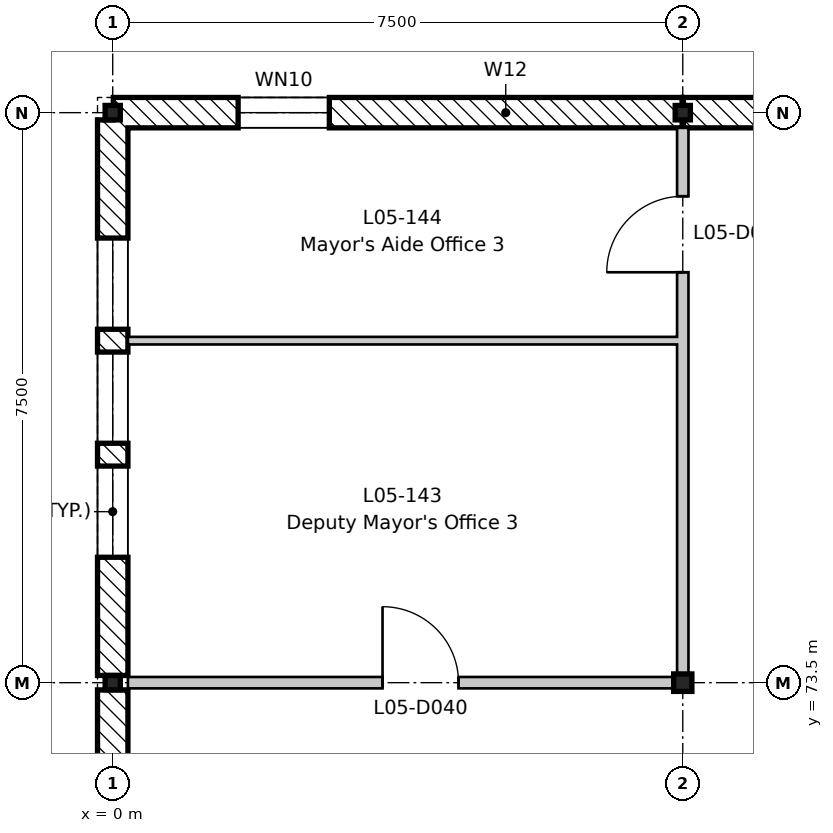
"""IFC4 building model, lengths in metres.
Left out: names, types, materials, properties, quantities, classifications, styles, units other than length and angle.
Written with IfcOpenShell. Run it as: python <this file> out.ifc"""

import sys

from ifc_helpers import new_model, si_unit, direction, frame, frame_2d, origin, origin_2d, place, context, subcontext, project, spatial, rectangle, i_section, extrude, element, fill, save


model = new_model("IFC4")
c1 = context("Model", 3, precision=1e-05, world=origin(), true_north=direction((0.0, 1.0)))
c2 = subcontext(c1, "Body", "Model", "MODEL_VIEW")
j1 = project(units=[si_unit("LENGTHUNIT", "METRE"), si_unit("PLANEANGLEUNIT", "RADIAN")], contexts=[c1])
p1 = place(None, origin())
s1 = spatial("IfcSite", under=j1, at=p1, CompositionType="ELEMENT")
p2 = place(p1, origin())
s2 = spatial("IfcBuilding", under=s1, at=p2, CompositionType="ELEMENT")
p3 = place(p2, frame((0.0, 0.0, 22.8)))
s3 = spatial("IfcBuildingStorey", under=s2, at=p3, CompositionType="ELEMENT", Elevation=22.8)
for number, where, z_axis, x_axis in (
    (1, (0.0, 73.5, -0.2), (0.0, 0.0, 1.0), (1.0, 0.0, 0.0)),
    (2, (0.0, 81.0, -0.2), (0.0, 0.0, 1.0), (1.0, 0.0, 0.0)),
):
    element("IfcColumn", number, at=place(p3, frame(where, z_axis=z_axis, x_axis=x_axis)), inside=s3, PredefinedType="COLUMN", context=c2, shape_type="SweptSolid", body=[
        extrude(i_section(OverallWidth=0.2, OverallDepth=0.19, WebThickness=0.007, FlangeThickness=0.01, FilletRadius=0.018, at=origin_2d()), origin(), (0.0, 0.0, 1.0), 4.15),
    ])
p4 = place(p3, frame((7.5, 73.5, -0.2), z_axis=(0.0, 0.0, 1.0), x_axis=(1.0, 0.0, 0.0)))
e3 = element("IfcColumn", 3, at=p4, inside=s3, PredefinedType="COLUMN", context=c2, shape_type="SweptSolid", body=[
    extrude(i_section(OverallWidth=0.24, OverallDepth=0.23, WebThickness=0.008, FlangeThickness=0.012, FilletRadius=0.021, at=origin_2d()), origin(), (0.0, 0.0, 1.0), 4.15),
])
p5 = place(p3, frame((7.5, 81.0, -0.2), z_axis=(0.0, 0.0, 1.0), x_axis=(1.0, 0.0, 0.0)))
e4 = element("IfcColumn", 4, at=p5, inside=s3, PredefinedType="COLUMN", context=c2, shape_type="SweptSolid", body=[
    extrude(i_section(OverallWidth=0.2, OverallDepth=0.19, WebThickness=0.007, FlangeThickness=0.01, FilletRadius=0.018, at=origin_2d()), origin(), (0.0, 0.0, 1.0), 4.15),
])
p6 = place(p3, frame((0.0, 70.595, 0.0), z_axis=(0.0, 0.0, 1.0), x_axis=(0.0, 1.0, 0.0)))
e5 = element("IfcWall", 5, at=p6, inside=s3, PredefinedType="STANDARD", context=c2, shape_type="SweptSolid", body=[
    extrude(rectangle(XDim=2.81, YDim=0.4, at=frame_2d((1.405, 0.0))), origin(), (0.0, 0.0, 1.0), 3.68),
])
p7 = place(p3, frame((0.0, 73.595, 0.0), z_axis=(0.0, 0.0, 1.0), x_axis=(0.0, 1.0, 0.0)))
e6 = element("IfcWall", 6, at=p7, inside=s3, PredefinedType="STANDARD", context=c2, shape_type="SweptSolid", body=[
    extrude(rectangle(XDim=7.31, YDim=0.4, at=frame_2d((3.655, 0.0))), origin(), (0.0, 0.0, 1.0), 3.55),
])
p8 = place(p7, frame((1.555, 0.0, 0.6)))
e7 = element("IfcOpeningElement", 7, at=p8, cuts=e6, PredefinedType="OPENING", context=c2, shape_type="SweptSolid", body=[
    extrude(rectangle(XDim=1.2, YDim=1.8, at=frame_2d((0.6, 0.9))), frame((0.0, 0.21, 0.0), z_axis=(0.0, -1.0, 0.0), x_axis=(1.0, 0.0, 0.0)), (0.0, 0.0, 1.0), 0.42),
])
p9 = place(p7, frame((3.055, 0.0, 0.6)))
e8 = element("IfcOpeningElement", 8, at=p9, cuts=e6, PredefinedType="OPENING", context=c2, shape_type="SweptSolid", body=[
    extrude(rectangle(XDim=1.2, YDim=1.8, at=frame_2d((0.6, 0.9))), frame((0.0, 0.21, 0.0), z_axis=(0.0, -1.0, 0.0), x_axis=(1.0, 0.0, 0.0)), (0.0, 0.0, 1.0), 0.42),
])
p10 = place(p7, frame((4.555, 0.0, 0.6)))
e9 = element("IfcOpeningElement", 9, at=p10, cuts=e6, PredefinedType="OPENING", context=c2, shape_type="SweptSolid", body=[
    extrude(rectangle(XDim=1.2, YDim=1.8, at=frame_2d((0.6, 0.9))), frame((0.0, 0.21, 0.0), z_axis=(0.0, -1.0, 0.0), x_axis=(1.0, 0.0, 0.0)), (0.0, 0.0, 1.0), 0.42),
])
p11 = place(p3, frame((0.008, 81.0, 0.0), z_axis=(0.0, 0.0, 1.0), x_axis=(1.0, 0.0, 0.0)))
e10 = element("IfcWall", 10, at=p11, inside=s3, PredefinedType="STANDARD", context=c2, shape_type="SweptSolid", body=[
    extrude(rectangle(XDim=7.483, YDim=0.4, at=frame_2d((3.742, 0.0))), origin(), (0.0, 0.0, 1.0), 3.62),
])
p12 = place(p11, frame((1.642, 0.0, 0.6)))
e11 = element("IfcOpeningElement", 11, at=p12, cuts=e10, PredefinedType="OPENING", context=c2, shape_type="SweptSolid", body=[
    extrude(rectangle(XDim=1.2, YDim=1.8, at=frame_2d((0.6, 0.9))), frame((0.0, 0.21, 0.0), z_axis=(0.0, -1.0, 0.0), x_axis=(1.0, 0.0, 0.0)), (0.0, 0.0, 1.0), 0.42),
])
p13 = place(p3, frame((7.508, 81.0, 0.0), z_axis=(0.0, 0.0, 1.0), x_axis=(1.0, 0.0, 0.0)))
e12 = element("IfcWall", 12, at=p13, inside=s3, PredefinedType="STANDARD", context=c2, shape_type="SweptSolid", body=[
    extrude(rectangle(XDim=2.983, YDim=0.4, at=frame_2d((1.492, 0.0))), origin(), (0.0, 0.0, 1.0), 3.75),
])
p14 = place(p3, frame((7.5, 73.5, 0.0), z_axis=(0.0, 0.0, 1.0), x_axis=(0.0, 1.0, 0.0)))
e13 = element("IfcWall", 13, at=p14, inside=s3, PredefinedType="PARTITIONING", context=c2, shape_type="SweptSolid", body=[
    extrude(rectangle(XDim=7.3, YDim=0.15, at=frame_2d((3.65, 0.0))), origin(), (0.0, 0.0, 1.0), 3.43),
])
p15 = place(p14, frame((5.4, 0.0, 0.0)))
e14 = element("IfcOpeningElement", 14, at=p15, cuts=e13, PredefinedType="OPENING", context=c2, shape_type="SweptSolid", body=[
    extrude(rectangle(XDim=1.0, YDim=2.1, at=frame_2d((0.5, 1.05))), frame((0.0, 0.085, 0.0), z_axis=(0.0, -1.0, 0.0), x_axis=(1.0, 0.0, 0.0)), (0.0, 0.0, 1.0), 0.17),
])
p16 = place(p3, frame((0.2, 73.5, 0.0), z_axis=(0.0, 0.0, 1.0), x_axis=(1.0, 0.0, 0.0)))
e15 = element("IfcWall", 15, at=p16, inside=s3, PredefinedType="PARTITIONING", context=c2, shape_type="SweptSolid", body=[
    extrude(rectangle(XDim=7.225, YDim=0.15, at=frame_2d((3.613, 0.0))), origin(), (0.0, 0.0, 1.0), 3.6),
])
p17 = place(p16, frame((3.35, 0.0, 0.0)))
e16 = element("IfcOpeningElement", 16, at=p17, cuts=e15, PredefinedType="OPENING", context=c2, shape_type="SweptSolid", body=[
    extrude(rectangle(XDim=1.0, YDim=2.1, at=frame_2d((0.5, 1.05))), frame((0.0, 0.085, 0.0), z_axis=(0.0, -1.0, 0.0), x_axis=(1.0, 0.0, 0.0)), (0.0, 0.0, 1.0), 0.17),
])
p18 = place(p3, frame((0.2, 78.0, 0.0), z_axis=(0.0, 0.0, 1.0), x_axis=(1.0, 0.0, 0.0)))
e17 = element("IfcWall", 17, at=p18, inside=s3, PredefinedType="PARTITIONING", context=c2, shape_type="SweptSolid", body=[
    extrude(rectangle(XDim=7.225, YDim=0.1, at=frame_2d((3.613, 0.0))), origin(), (0.0, 0.0, 1.0), 3.95),
])
p19 = place(p8, origin())
e18 = element("IfcWindow", 18, at=p19, inside=s3, PartitioningType="SINGLE_PANEL", PredefinedType="WINDOW", context=c2, shape_type="SweptSolid", body=[
    extrude(rectangle(XDim=1.2, YDim=1.8, at=frame_2d((0.6, 0.9))), frame((0.0, 0.03, 0.0), z_axis=(0.0, -1.0, 0.0), x_axis=(1.0, 0.0, 0.0)), (0.0, 0.0, 1.0), 0.06),
])
fill(e7, e18)
p20 = place(p9, origin())
e19 = element("IfcWindow", 19, at=p20, inside=s3, PartitioningType="SINGLE_PANEL", PredefinedType="WINDOW", context=c2, shape_type="SweptSolid", body=[
    extrude(rectangle(XDim=1.2, YDim=1.8, at=frame_2d((0.6, 0.9))), frame((0.0, 0.03, 0.0), z_axis=(0.0, -1.0, 0.0), x_axis=(1.0, 0.0, 0.0)), (0.0, 0.0, 1.0), 0.06),
])
fill(e8, e19)
p21 = place(p10, origin())
e20 = element("IfcWindow", 20, at=p21, inside=s3, PartitioningType="SINGLE_PANEL", PredefinedType="WINDOW", context=c2, shape_type="SweptSolid", body=[
    extrude(rectangle(XDim=1.2, YDim=1.8, at=frame_2d((0.6, 0.9))), frame((0.0, 0.03, 0.0), z_axis=(0.0, -1.0, 0.0), x_axis=(1.0, 0.0, 0.0)), (0.0, 0.0, 1.0), 0.06),
])
fill(e9, e20)
p22 = place(p12, origin())
e21 = element("IfcWindow", 21, at=p22, inside=s3, PartitioningType="SINGLE_PANEL", PredefinedType="WINDOW", context=c2, shape_type="SweptSolid", body=[
    extrude(rectangle(XDim=1.2, YDim=1.8, at=frame_2d((0.6, 0.9))), frame((0.0, 0.03, 0.0), z_axis=(0.0, -1.0, 0.0), x_axis=(1.0, 0.0, 0.0)), (0.0, 0.0, 1.0), 0.06),
])
fill(e11, e21)
p23 = place(p17, origin())
e22 = element("IfcDoor", 22, at=p23, inside=s3, OperationType="SINGLE_SWING_LEFT", PredefinedType="DOOR", context=c2, shape_type="SweptSolid", body=[
    extrude(rectangle(XDim=1.0, YDim=2.1, at=frame_2d((0.5, 1.05))), frame((0.0, 0.025, 0.0), z_axis=(0.0, -1.0, 0.0), x_axis=(1.0, 0.0, 0.0)), (0.0, 0.0, 1.0), 0.05),
])
fill(e16, e22)
p24 = place(p15, origin())
e23 = element("IfcDoor", 23, at=p24, inside=s3, OperationType="SINGLE_SWING_LEFT", PredefinedType="DOOR", context=c2, shape_type="SweptSolid", body=[
    extrude(rectangle(XDim=1.0, YDim=2.1, at=frame_2d((0.5, 1.05))), frame((0.0, 0.025, 0.0), z_axis=(0.0, -1.0, 0.0), x_axis=(1.0, 0.0, 0.0)), (0.0, 0.0, 1.0), 0.05),
])
fill(e14, e23)
save(model, sys.argv[1])
